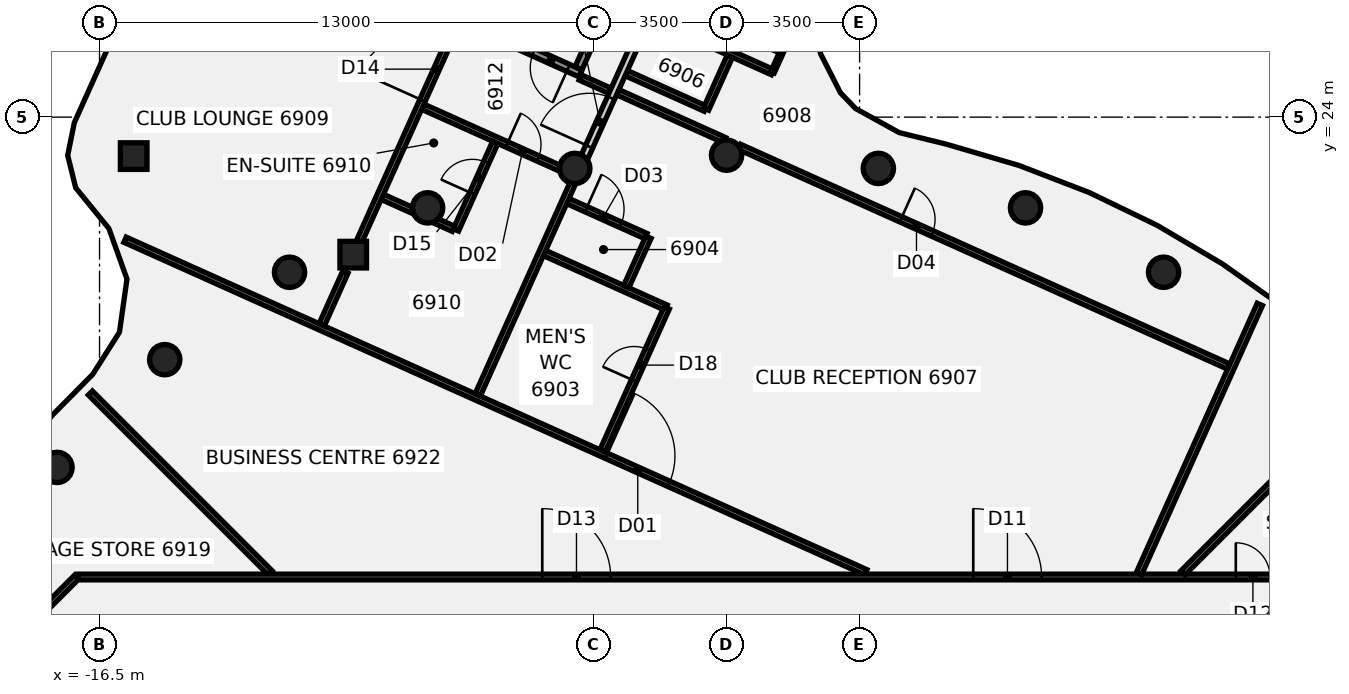
"""IFC4 building model, lengths in metres.
Left out: names, types, materials, properties, quantities, classifications, styles, units other than length and angle.
Written with IfcOpenShell. Run it as: python <this file> out.ifc"""

import sys

from ifc_helpers import new_model, si_unit, direction, frame, frame_2d, origin, origin_2d, place, context, subcontext, project, spatial, rectangle, circle, extrude, element, fill, save


model = new_model("IFC4")
c1 = context("Model", 3, precision=1e-05, world=origin(), true_north=direction((0.0, 1.0)))
c2 = subcontext(c1, "Body", "Model", "MODEL_VIEW")
j1 = project(units=[si_unit("LENGTHUNIT", "METRE"), si_unit("PLANEANGLEUNIT", "RADIAN")], contexts=[c1])
p1 = place(None, origin())
s1 = spatial("IfcSite", under=j1, at=p1, CompositionType="ELEMENT")
p2 = place(p1, origin())
s2 = spatial("IfcBuilding", under=s1, at=p2, CompositionType="ELEMENT")
p3 = place(p2, frame((0.0, 0.0, 271.2)))
s3 = spatial("IfcBuildingStorey", under=s2, at=p3, CompositionType="ELEMENT", Elevation=271.2)
for number, where, z_axis, x_axis in (
    (1, (11.5, 19.919, -0.14), (0.0, 0.0, 1.0), (1.0, 0.0, 0.0)),
    (2, (7.866, 21.613, -0.14), (0.0, 0.0, 1.0), (1.0, 0.0, 0.0)),
    (3, (3.994, 22.651, -0.14), (0.0, 0.0, 1.0), (1.0, 0.0, 0.0)),
    (4, (0.0, 23.0, -0.14), (0.0, 0.0, 1.0), (1.0, 0.0, 0.0)),
    (5, (-3.994, 22.651, -0.14), (0.0, 0.0, 1.0), (1.0, 0.0, 0.0)),
    (6, (-7.866, 21.613, -0.14), (0.0, 0.0, 1.0), (1.0, 0.0, 0.0)),
    (7, (-11.5, 19.919, -0.14), (0.0, 0.0, 1.0), (1.0, 0.0, 0.0)),
    (8, (-14.784, 17.619, -0.14), (0.0, 0.0, 1.0), (1.0, 0.0, 0.0)),
    (9, (-17.619, 14.784, -0.14), (0.0, 0.0, 1.0), (1.0, 0.0, 0.0)),
):
    element("IfcColumn", number, at=place(p3, frame(where, z_axis=z_axis, x_axis=x_axis)), inside=s3, PredefinedType="COLUMN", context=c2, shape_type="SweptSolid", body=[
        extrude(circle(Radius=0.4, at=origin_2d()), origin(), (0.0, 0.0, 1.0), 3.6),
    ])
p4 = place(p3, frame((-9.824, 20.382, -0.139), z_axis=(0.008608000025, -0.049614614315, 0.998731341444), x_axis=(0.410264887892, 0.91101157612, 0.041720857344)))
e10 = element("IfcColumn", 10, at=p4, inside=s3, PredefinedType="COLUMN", context=c2, shape_type="SweptSolid", body=[
    extrude(rectangle(XDim=0.7, YDim=0.7, at=origin_2d()), origin(), (0.0, 0.0, 1.0), 3.602),
])
p5 = place(p3, frame((-15.601, 22.975, -0.138), z_axis=(0.096287081646, -0.121046616926, 0.987965846798), x_axis=(0.413174316945, 0.907882535997, 0.070966785529)))
e11 = element("IfcColumn", 11, at=p5, inside=s3, PredefinedType="COLUMN", context=c2, shape_type="SweptSolid", body=[
    extrude(rectangle(XDim=0.7, YDim=0.7, at=origin_2d()), origin(), (0.0, 0.0, 1.0), 3.638),
])
p6 = place(p3, frame((-16.742, 16.742, 0.0), z_axis=(0.0, 0.0, 1.0), x_axis=(0.707106781187, -0.707106781187, 0.0)))
e12 = element("IfcWall", 12, at=p6, inside=s3, PredefinedType="PARTITIONING", context=c2, shape_type="SweptSolid", body=[
    extrude(rectangle(XDim=6.692, YDim=0.15, at=frame_2d((3.346, 0.0))), origin(), (0.0, 0.0, 1.0), 2.864),
])
p7 = place(p3, frame((-15.829, 20.775, 0.0), z_axis=(0.0, 0.0, 1.0), x_axis=(0.912288876362, -0.409547318469, 0.0)))
e13 = element("IfcWall", 13, at=p7, inside=s3, PredefinedType="PARTITIONING", context=c2, shape_type="SweptSolid", body=[
    extrude(rectangle(XDim=21.366, YDim=0.15, at=frame_2d((10.683, 0.0))), origin(), (0.0, 0.0, 1.0), 2.864),
])
p8 = place(p7, frame((13.889, 0.0, 0.0)))
e14 = element("IfcOpeningElement", 14, at=p8, cuts=e13, PredefinedType="OPENING", context=c2, shape_type="SweptSolid", body=[
    extrude(rectangle(XDim=1.8, YDim=2.1, at=frame_2d((0.9, 1.05))), frame((0.0, 0.085, 0.0), z_axis=(0.0, -1.0, 0.0), x_axis=(1.0, 0.0, 0.0)), (0.0, 0.0, 1.0), 0.17),
])
p9 = place(p3, frame((-9.06, 21.902, 0.0), z_axis=(0.0, 0.0, 1.0), x_axis=(0.912258944897, -0.409613985913, 0.0)))
e15 = element("IfcWall", 15, at=p9, inside=s3, PredefinedType="PARTITIONING", context=c2, shape_type="SweptSolid", body=[
    extrude(rectangle(XDim=0.879, YDim=0.15, at=frame_2d((0.439, 0.0))), origin(), (0.0, 0.0, 1.0), 2.864),
])
p10 = place(p3, frame((-7.65, 21.269, 0.0), z_axis=(0.0, 0.0, 1.0), x_axis=(0.912409667444, -0.409278143509, 0.0)))
e16 = element("IfcWall", 16, at=p10, inside=s3, PredefinedType="PARTITIONING", context=c2, shape_type="SweptSolid", body=[
    extrude(rectangle(XDim=0.505, YDim=0.15, at=frame_2d((0.252, 0.0))), origin(), (0.0, 0.0, 1.0), 2.864),
])
p11 = place(p3, frame((-7.99, 24.272, 0.0), z_axis=(0.0, 0.0, 1.0), x_axis=(0.912292721539, -0.409538753023, 0.0)))
e17 = element("IfcWall", 17, at=p11, inside=s3, PredefinedType="PARTITIONING", context=c2, shape_type="SweptSolid", body=[
    extrude(rectangle(XDim=3.934, YDim=0.15, at=frame_2d((1.967, 0.0))), origin(), (0.0, 0.0, 1.0), 2.864),
])
p12 = place(p11, frame((2.42, 0.0, 0.0)))
e18 = element("IfcOpeningElement", 18, at=p12, cuts=e17, PredefinedType="OPENING", context=c2, shape_type="SweptSolid", body=[
    extrude(rectangle(XDim=0.9, YDim=2.1, at=frame_2d((0.45, 1.05))), frame((0.0, 0.085, 0.0), z_axis=(0.0, -1.0, 0.0), x_axis=(1.0, 0.0, 0.0)), (0.0, 0.0, 1.0), 0.17),
])
p13 = place(p3, frame((-4.791, 20.424, 0.0), z_axis=(0.0, 0.0, 1.0), x_axis=(0.912213220813, -0.409715803667, 0.0)))
e19 = element("IfcWall", 19, at=p13, inside=s3, PredefinedType="PARTITIONING", context=c2, shape_type="SweptSolid", body=[
    extrude(rectangle(XDim=3.505, YDim=0.15, at=frame_2d((1.752, 0.0))), origin(), (0.0, 0.0, 1.0), 2.864),
])
p14 = place(p3, frame((-4.177, 21.792, 0.0), z_axis=(0.0, 0.0, 1.0), x_axis=(0.91230675478, -0.409507490998, 0.0)))
e20 = element("IfcWall", 20, at=p14, inside=s3, PredefinedType="PARTITIONING", context=c2, shape_type="SweptSolid", body=[
    extrude(rectangle(XDim=2.25, YDim=0.15, at=frame_2d((1.125, 0.0))), origin(), (0.0, 0.0, 1.0), 2.864),
])
p15 = place(p14, frame((0.525, 0.0, 0.0)))
e21 = element("IfcOpeningElement", 21, at=p15, cuts=e20, PredefinedType="OPENING", context=c2, shape_type="SweptSolid", body=[
    extrude(rectangle(XDim=1.0, YDim=2.1, at=frame_2d((0.5, 1.05))), frame((0.0, 0.085, 0.0), z_axis=(0.0, -1.0, 0.0), x_axis=(1.0, 0.0, 0.0)), (0.0, 0.0, 1.0), 0.17),
])
p16 = place(p3, frame((-3.85, 25.044, 0.0), z_axis=(0.0, 0.0, 1.0), x_axis=(0.91233270994, -0.409449662807, 0.0)))
e22 = element("IfcWall", 22, at=p16, inside=s3, PredefinedType="PARTITIONING", context=c2, shape_type="SweptSolid", body=[
    extrude(rectangle(XDim=0.854, YDim=0.15, at=frame_2d((0.427, 0.0))), origin(), (0.0, 0.0, 1.0), 2.864),
])
p17 = place(p3, frame((-2.864, 24.656, 0.0), z_axis=(0.0, 0.0, 1.0), x_axis=(0.912258042775, -0.409615995039, 0.0)))
e23 = element("IfcWall", 23, at=p17, inside=s3, PredefinedType="PARTITIONING", context=c2, shape_type="SweptSolid", body=[
    extrude(rectangle(XDim=3.078, YDim=0.15, at=frame_2d((1.539, 0.0))), origin(), (0.0, 0.0, 1.0), 2.864),
])
p18 = place(p3, frame((0.344, 23.216, 0.0), z_axis=(0.0, 0.0, 1.0), x_axis=(0.912270853128, -0.409587463838, 0.0)))
e24 = element("IfcWall", 24, at=p18, inside=s3, PredefinedType="PARTITIONING", context=c2, shape_type="SweptSolid", body=[
    extrude(rectangle(XDim=14.109, YDim=0.15, at=frame_2d((7.054, 0.0))), origin(), (0.0, 0.0, 1.0), 2.864),
])
p19 = place(p18, frame((4.65, 0.0, 0.0)))
e25 = element("IfcOpeningElement", 25, at=p19, cuts=e24, PredefinedType="OPENING", context=c2, shape_type="SweptSolid", body=[
    extrude(rectangle(XDim=0.9, YDim=2.1, at=frame_2d((0.45, 1.05))), frame((0.0, 0.085, 0.0), z_axis=(0.0, -1.0, 0.0), x_axis=(1.0, 0.0, 0.0)), (0.0, 0.0, 1.0), 0.17),
])
p20 = place(p3, frame((-2.638, 25.157, 0.0), z_axis=(0.0, 0.0, 1.0), x_axis=(0.912245848383, -0.409643152156, 0.0)))
e26 = element("IfcWall", 26, at=p20, inside=s3, PredefinedType="PARTITIONING", context=c2, shape_type="SweptSolid", body=[
    extrude(rectangle(XDim=2.28, YDim=0.15, at=frame_2d((1.14, 0.0))), origin(), (0.0, 0.0, 1.0), 2.864),
])
p21 = place(p3, frame((-1.983, 26.617, 0.0), z_axis=(0.0, 0.0, 1.0), x_axis=(0.912251445875, -0.409630686715, 0.0)))
e27 = element("IfcWall", 27, at=p21, inside=s3, PredefinedType="PARTITIONING", context=c2, shape_type="SweptSolid", body=[
    extrude(rectangle(XDim=3.5, YDim=0.15, at=frame_2d((1.75, 0.0))), origin(), (0.0, 0.0, 1.0), 2.864),
])
p22 = place(p21, frame((0.5, 0.0, 0.0)))
e28 = element("IfcOpeningElement", 28, at=p22, cuts=e27, PredefinedType="OPENING", context=c2, shape_type="SweptSolid", body=[
    extrude(rectangle(XDim=0.9, YDim=2.1, at=frame_2d((0.45, 1.05))), frame((0.0, 0.085, 0.0), z_axis=(0.0, -1.0, 0.0), x_axis=(1.0, 0.0, 0.0)), (0.0, 0.0, 1.0), 0.17),
])
p23 = place(p3, frame((-17.065, 11.9, 0.0), z_axis=(0.0, 0.0, 1.0), x_axis=(1.0, 0.0, 0.0)))
e29 = element("IfcWall", 29, at=p23, inside=s3, PredefinedType="PARTITIONING", context=c2, shape_type="SweptSolid", body=[
    extrude(rectangle(XDim=34.165, YDim=0.15, at=frame_2d((17.083, 0.0))), origin(), (0.0, 0.0, 1.0), 2.864),
])
p24 = place(p23, frame((23.556, 0.0, 0.0)))
e30 = element("IfcOpeningElement", 30, at=p24, cuts=e29, PredefinedType="OPENING", context=c2, shape_type="SweptSolid", body=[
    extrude(rectangle(XDim=1.8, YDim=2.1, at=frame_2d((0.9, 1.05))), frame((0.0, 0.085, 0.0), z_axis=(0.0, -1.0, 0.0), x_axis=(1.0, 0.0, 0.0)), (0.0, 0.0, 1.0), 0.17),
])
p25 = place(p23, frame((30.465, 0.0, 0.0)))
e31 = element("IfcOpeningElement", 31, at=p25, cuts=e29, PredefinedType="OPENING", context=c2, shape_type="SweptSolid", body=[
    extrude(rectangle(XDim=0.9, YDim=2.1, at=frame_2d((0.45, 1.05))), frame((0.0, 0.085, 0.0), z_axis=(0.0, -1.0, 0.0), x_axis=(1.0, 0.0, 0.0)), (0.0, 0.0, 1.0), 0.17),
])
p26 = place(p23, frame((12.215, 0.0, 0.0)))
e32 = element("IfcOpeningElement", 32, at=p26, cuts=e29, PredefinedType="OPENING", context=c2, shape_type="SweptSolid", body=[
    extrude(rectangle(XDim=1.8, YDim=2.1, at=frame_2d((0.9, 1.05))), frame((0.0, 0.085, 0.0), z_axis=(0.0, -1.0, 0.0), x_axis=(1.0, 0.0, 0.0)), (0.0, 0.0, 1.0), 0.17),
])
p27 = place(p3, frame((-18.872, 10.128, 0.0), z_axis=(0.0, 0.0, 1.0), x_axis=(0.707106781187, 0.707106781187, 0.0)))
e33 = element("IfcWall", 33, at=p27, inside=s3, PredefinedType="PARTITIONING", context=c2, shape_type="SweptSolid", body=[
    extrude(rectangle(XDim=2.505, YDim=0.15, at=frame_2d((1.253, 0.0))), origin(), (0.0, 0.0, 1.0), 2.864),
])
p28 = place(p3, frame((12.01, 12.01, 0.0), z_axis=(0.0, 0.0, 1.0), x_axis=(0.707106781187, 0.707106781187, 0.0)))
e34 = element("IfcWall", 34, at=p28, inside=s3, PredefinedType="PARTITIONING", context=c2, shape_type="SweptSolid", body=[
    extrude(rectangle(XDim=6.691, YDim=0.15, at=frame_2d((3.345, 0.0))), origin(), (0.0, 0.0, 1.0), 2.864),
])
p29 = place(p3, frame((-10.654, 18.534, 0.0), z_axis=(0.0, 0.0, 1.0), x_axis=(0.409685570303, 0.912226799368, 0.0)))
e35 = element("IfcWall", 35, at=p29, inside=s3, PredefinedType="PARTITIONING", context=c2, shape_type="SweptSolid", body=[
    extrude(rectangle(XDim=1.525, YDim=0.15, at=frame_2d((0.762, 0.0))), origin(), (0.0, 0.0, 1.0), 2.864),
])
p30 = place(p3, frame((-9.686, 20.69, 0.0), z_axis=(0.0, 0.0, 1.0), x_axis=(0.409693375843, 0.912223293822, 0.0)))
e36 = element("IfcWall", 36, at=p30, inside=s3, PredefinedType="PARTITIONING", context=c2, shape_type="SweptSolid", body=[
    extrude(rectangle(XDim=6.322, YDim=0.15, at=frame_2d((3.161, 0.0))), origin(), (0.0, 0.0, 1.0), 2.864),
])
p31 = place(p30, frame((4.113, 0.0, 0.0)))
e37 = element("IfcOpeningElement", 37, at=p31, cuts=e36, PredefinedType="OPENING", context=c2, shape_type="SweptSolid", body=[
    extrude(rectangle(XDim=1.8, YDim=2.1, at=frame_2d((0.9, 1.05))), frame((0.0, 0.085, 0.0), z_axis=(0.0, -1.0, 0.0), x_axis=(1.0, 0.0, 0.0)), (0.0, 0.0, 1.0), 0.17),
])
p32 = place(p3, frame((-7.121, 21.032, 0.0), z_axis=(0.0, 0.0, 1.0), x_axis=(0.409624884937, 0.912254051041, 0.0)))
e38 = element("IfcWall", 38, at=p32, inside=s3, PredefinedType="PARTITIONING", context=c2, shape_type="SweptSolid", body=[
    extrude(rectangle(XDim=2.525, YDim=0.15, at=frame_2d((1.263, 0.0))), origin(), (0.0, 0.0, 1.0), 2.864),
])
p33 = place(p32, frame((1.05, 0.0, 0.0)))
e39 = element("IfcOpeningElement", 39, at=p33, cuts=e38, PredefinedType="OPENING", context=c2, shape_type="SweptSolid", body=[
    extrude(rectangle(XDim=0.9, YDim=2.1, at=frame_2d((0.45, 1.05))), frame((0.0, 0.085, 0.0), z_axis=(0.0, -1.0, 0.0), x_axis=(1.0, 0.0, 0.0)), (0.0, 0.0, 1.0), 0.17),
])
p34 = place(p3, frame((-6.548, 16.691, 0.0), z_axis=(0.0, 0.0, 1.0), x_axis=(0.409506235987, 0.912307318116, 0.0)))
e40 = element("IfcWall", 40, at=p34, inside=s3, PredefinedType="PARTITIONING", context=c2, shape_type="SweptSolid", body=[
    extrude(rectangle(XDim=6.257, YDim=0.15, at=frame_2d((3.128, 0.0))), origin(), (0.0, 0.0, 1.0), 2.864),
])
p35 = place(p3, frame((-3.802, 22.81, 0.0), z_axis=(0.0, 0.0, 1.0), x_axis=(0.409510455396, 0.912305424143, 0.0)))
e41 = element("IfcWall", 41, at=p35, inside=s3, PredefinedType="PARTITIONING", context=c2, shape_type="SweptSolid", body=[
    extrude(rectangle(XDim=7.417, YDim=0.2, at=frame_2d((3.708, 0.0))), origin(), (0.0, 0.0, 1.0), 2.864),
])
p36 = place(p35, frame((0.458, 0.0, 0.0)))
e42 = element("IfcOpeningElement", 42, at=p36, cuts=e41, PredefinedType="OPENING", context=c2, shape_type="SweptSolid", body=[
    extrude(rectangle(XDim=1.4, YDim=2.1, at=frame_2d((0.7, 1.05))), frame((0.0, 0.11, 0.0), z_axis=(0.0, -1.0, 0.0), x_axis=(1.0, 0.0, 0.0)), (0.0, 0.0, 1.0), 0.22),
])
p37 = place(p35, frame((4.968, 0.0, 0.0)))
e43 = element("IfcOpeningElement", 43, at=p37, cuts=e41, PredefinedType="OPENING", context=c2, shape_type="SweptSolid", body=[
    extrude(rectangle(XDim=0.9, YDim=2.1, at=frame_2d((0.45, 1.05))), frame((0.0, 0.11, 0.0), z_axis=(0.0, -1.0, 0.0), x_axis=(1.0, 0.0, 0.0)), (0.0, 0.0, 1.0), 0.22),
])
p38 = place(p3, frame((-3.264, 15.217, 0.0), z_axis=(0.0, 0.0, 1.0), x_axis=(0.409606488137, 0.912262311441, 0.0)))
e44 = element("IfcWall", 44, at=p38, inside=s3, PredefinedType="PARTITIONING", context=c2, shape_type="SweptSolid", body=[
    extrude(rectangle(XDim=4.125, YDim=0.15, at=frame_2d((2.062, 0.0))), origin(), (0.0, 0.0, 1.0), 2.864),
])
p39 = place(p38, frame((2.025, 0.0, 0.0)))
e45 = element("IfcOpeningElement", 45, at=p39, cuts=e44, PredefinedType="OPENING", context=c2, shape_type="SweptSolid", body=[
    extrude(rectangle(XDim=0.9, YDim=2.1, at=frame_2d((0.45, 1.05))), frame((0.0, 0.085, 0.0), z_axis=(0.0, -1.0, 0.0), x_axis=(1.0, 0.0, 0.0)), (0.0, 0.0, 1.0), 0.17),
])
p40 = place(p3, frame((1.21, 25.184, 0.0), z_axis=(0.0, 0.0, 1.0), x_axis=(0.409598326261, 0.912265976086, 0.0)))
e46 = element("IfcWall", 46, at=p40, inside=s3, PredefinedType="PARTITIONING", context=c2, shape_type="SweptSolid", body=[
    extrude(rectangle(XDim=2.093, YDim=0.1, at=frame_2d((1.047, 0.0))), origin(), (0.0, 0.0, 1.0), 2.864),
])
p41 = place(p40, frame((0.5, 0.0, 0.0)))
e47 = element("IfcOpeningElement", 47, at=p41, cuts=e46, PredefinedType="OPENING", context=c2, shape_type="SweptSolid", body=[
    extrude(rectangle(XDim=0.9, YDim=2.1, at=frame_2d((0.45, 1.05))), frame((0.0, 0.06, 0.0), z_axis=(0.0, -1.0, 0.0), x_axis=(1.0, 0.0, 0.0)), (0.0, 0.0, 1.0), 0.12),
])
p42 = place(p3, frame((-2.639, 19.54, 0.0), z_axis=(0.0, 0.0, 1.0), x_axis=(0.409965725426, 0.912100928612, 0.0)))
e48 = element("IfcWall", 48, at=p42, inside=s3, PredefinedType="PARTITIONING", context=c2, shape_type="SweptSolid", body=[
    extrude(rectangle(XDim=1.425, YDim=0.15, at=frame_2d((0.712, 0.0))), origin(), (0.0, 0.0, 1.0), 2.864),
])
p43 = place(p3, frame((-0.538, 24.214, 0.0), z_axis=(0.0, 0.0, 1.0), x_axis=(0.410085127613, 0.91204725103, 0.0)))
e49 = element("IfcWall", 49, at=p43, inside=s3, PredefinedType="PARTITIONING", context=c2, shape_type="SweptSolid", body=[
    extrude(rectangle(XDim=1.525, YDim=0.15, at=frame_2d((0.763, 0.0))), origin(), (0.0, 0.0, 1.0), 2.864),
])
p44 = place(p3, frame((10.851, 11.987, 0.0), z_axis=(0.0, 0.0, 1.0), x_axis=(0.409585598201, 0.912271690751, 0.0)))
e50 = element("IfcWall", 50, at=p44, inside=s3, PredefinedType="PARTITIONING", context=c2, shape_type="SweptSolid", body=[
    extrude(rectangle(XDim=7.767, YDim=0.15, at=frame_2d((3.884, 0.0))), origin(), (0.0, 0.0, 1.0), 2.864),
])
p45 = place(p3, frame((-3.846, 25.152, -0.14), z_axis=(0.0, 0.0, 1.0), x_axis=(-0.912278425162, 0.409570598291, 0.0)))
e51 = element("IfcWall", 51, at=p45, inside=s3, PredefinedType="SHEAR", context=c2, shape_type="SweptSolid", body=[
    extrude(rectangle(XDim=6.7, YDim=0.2, at=frame_2d((3.35, 0.0))), origin(), (0.0, 0.0, 1.0), 3.154),
])
p46 = place(p45, frame((0.35, 0.0, 0.0)))
e52 = element("IfcOpeningElement", 52, at=p46, cuts=e51, PredefinedType="OPENING", context=c2, shape_type="SweptSolid", body=[
    extrude(rectangle(XDim=1.0, YDim=2.1, at=frame_2d((0.5, 1.05))), frame((0.0, 0.11, 0.0), z_axis=(0.0, -1.0, 0.0), x_axis=(1.0, 0.0, 0.0)), (0.0, 0.0, 1.0), 0.22),
])
p47 = place(p3, frame((-2.586, 28.203, -0.14), z_axis=(0.0, 0.0, 1.0), x_axis=(-0.409561893765, -0.912282333039, 0.0)))
e53 = element("IfcWall", 53, at=p47, inside=s3, PredefinedType="SHEAR", context=c2, shape_type="SweptSolid", body=[
    extrude(rectangle(XDim=3.2, YDim=0.2, at=frame_2d((1.6, 0.0))), origin(), (0.0, 0.0, 1.0), 3.6),
])
p48 = place(p8, origin())
e54 = element("IfcDoor", 54, at=p48, inside=s3, OperationType="DOUBLE_DOOR_SINGLE_SWING", PredefinedType="DOOR", context=c2, shape_type="SweptSolid", body=[
    extrude(rectangle(XDim=1.8, YDim=2.1, at=frame_2d((0.9, 1.05))), frame((0.0, 0.025, 0.0), z_axis=(0.0, -1.0, 0.0), x_axis=(1.0, 0.0, 0.0)), (0.0, 0.0, 1.0), 0.05),
])
fill(e14, e54)
p49 = place(p12, frame((0.9, 0.0, 0.0), z_axis=(0.0, 0.0, 1.0), x_axis=(-1.0, 0.0, 0.0)))
e55 = element("IfcDoor", 55, at=p49, inside=s3, OperationType="SINGLE_SWING_RIGHT", PredefinedType="DOOR", context=c2, shape_type="SweptSolid", body=[
    extrude(rectangle(XDim=0.9, YDim=2.1, at=frame_2d((0.45, 1.05))), frame((0.0, 0.025, 0.0), z_axis=(0.0, -1.0, 0.0), x_axis=(1.0, 0.0, 0.0)), (0.0, 0.0, 1.0), 0.05),
])
fill(e18, e55)
p50 = place(p15, frame((1.0, 0.0, 0.0), z_axis=(0.0, 0.0, 1.0), x_axis=(-1.0, 0.0, 0.0)))
e56 = element("IfcDoor", 56, at=p50, inside=s3, OperationType="SINGLE_SWING_LEFT", PredefinedType="DOOR", context=c2, shape_type="SweptSolid", body=[
    extrude(rectangle(XDim=1.0, YDim=2.1, at=frame_2d((0.5, 1.05))), frame((0.0, 0.025, 0.0), z_axis=(0.0, -1.0, 0.0), x_axis=(1.0, 0.0, 0.0)), (0.0, 0.0, 1.0), 0.05),
])
fill(e21, e56)
p51 = place(p19, origin())
e57 = element("IfcDoor", 57, at=p51, inside=s3, OperationType="SINGLE_SWING_RIGHT", PredefinedType="DOOR", context=c2, shape_type="SweptSolid", body=[
    extrude(rectangle(XDim=0.9, YDim=2.1, at=frame_2d((0.45, 1.05))), frame((0.0, 0.025, 0.0), z_axis=(0.0, -1.0, 0.0), x_axis=(1.0, 0.0, 0.0)), (0.0, 0.0, 1.0), 0.05),
])
fill(e25, e57)
p52 = place(p24, frame((1.8, 0.0, 0.0), z_axis=(0.0, 0.0, 1.0), x_axis=(-1.0, 0.0, 0.0)))
e58 = element("IfcDoor", 58, at=p52, inside=s3, OperationType="DOUBLE_DOOR_SINGLE_SWING", PredefinedType="DOOR", context=c2, shape_type="SweptSolid", body=[
    extrude(rectangle(XDim=1.8, YDim=2.1, at=frame_2d((0.9, 1.05))), frame((0.0, 0.025, 0.0), z_axis=(0.0, -1.0, 0.0), x_axis=(1.0, 0.0, 0.0)), (0.0, 0.0, 1.0), 0.05),
])
fill(e30, e58)
p53 = place(p25, origin())
e59 = element("IfcDoor", 59, at=p53, inside=s3, OperationType="SINGLE_SWING_LEFT", PredefinedType="DOOR", context=c2, shape_type="SweptSolid", body=[
    extrude(rectangle(XDim=0.9, YDim=2.1, at=frame_2d((0.45, 1.05))), frame((0.0, 0.025, 0.0), z_axis=(0.0, -1.0, 0.0), x_axis=(1.0, 0.0, 0.0)), (0.0, 0.0, 1.0), 0.05),
])
fill(e31, e59)
p54 = place(p26, frame((1.8, 0.0, 0.0), z_axis=(0.0, 0.0, 1.0), x_axis=(-1.0, 0.0, 0.0)))
e60 = element("IfcDoor", 60, at=p54, inside=s3, OperationType="DOUBLE_DOOR_SINGLE_SWING", PredefinedType="DOOR", context=c2, shape_type="SweptSolid", body=[
    extrude(rectangle(XDim=1.8, YDim=2.1, at=frame_2d((0.9, 1.05))), frame((0.0, 0.025, 0.0), z_axis=(0.0, -1.0, 0.0), x_axis=(1.0, 0.0, 0.0)), (0.0, 0.0, 1.0), 0.05),
])
fill(e32, e60)
p55 = place(p31, origin())
e61 = element("IfcDoor", 61, at=p55, inside=s3, OperationType="DOUBLE_DOOR_SINGLE_SWING", PredefinedType="DOOR", context=c2, shape_type="SweptSolid", body=[
    extrude(rectangle(XDim=1.8, YDim=2.1, at=frame_2d((0.9, 1.05))), frame((0.0, 0.025, 0.0), z_axis=(0.0, -1.0, 0.0), x_axis=(1.0, 0.0, 0.0)), (0.0, 0.0, 1.0), 0.05),
])
fill(e37, e61)
p56 = place(p33, origin())
e62 = element("IfcDoor", 62, at=p56, inside=s3, OperationType="SINGLE_SWING_LEFT", PredefinedType="DOOR", context=c2, shape_type="SweptSolid", body=[
    extrude(rectangle(XDim=0.9, YDim=2.1, at=frame_2d((0.45, 1.05))), frame((0.0, 0.025, 0.0), z_axis=(0.0, -1.0, 0.0), x_axis=(1.0, 0.0, 0.0)), (0.0, 0.0, 1.0), 0.05),
])
fill(e39, e62)
p57 = place(p36, frame((1.4, 0.0, 0.0), z_axis=(0.0, 0.0, 1.0), x_axis=(-1.0, 0.0, 0.0)))
e63 = element("IfcDoor", 63, at=p57, inside=s3, OperationType="DOUBLE_DOOR_SINGLE_SWING", PredefinedType="DOOR", context=c2, shape_type="SweptSolid", body=[
    extrude(rectangle(XDim=1.4, YDim=2.1, at=frame_2d((0.7, 1.05))), frame((0.0, 0.025, 0.0), z_axis=(0.0, -1.0, 0.0), x_axis=(1.0, 0.0, 0.0)), (0.0, 0.0, 1.0), 0.05),
])
fill(e42, e63)
p58 = place(p39, origin())
e64 = element("IfcDoor", 64, at=p58, inside=s3, OperationType="SINGLE_SWING_LEFT", PredefinedType="DOOR", context=c2, shape_type="SweptSolid", body=[
    extrude(rectangle(XDim=0.9, YDim=2.1, at=frame_2d((0.45, 1.05))), frame((0.0, 0.025, 0.0), z_axis=(0.0, -1.0, 0.0), x_axis=(1.0, 0.0, 0.0)), (0.0, 0.0, 1.0), 0.05),
])
fill(e45, e64)
p59 = place(p41, origin())
e65 = element("IfcDoor", 65, at=p59, inside=s3, OperationType="SINGLE_SWING_RIGHT", PredefinedType="DOOR", context=c2, shape_type="SweptSolid", body=[
    extrude(rectangle(XDim=0.9, YDim=2.1, at=frame_2d((0.45, 1.05))), frame((0.0, 0.025, 0.0), z_axis=(0.0, -1.0, 0.0), x_axis=(1.0, 0.0, 0.0)), (0.0, 0.0, 1.0), 0.05),
])
fill(e47, e65)
p60 = place(p46, origin())
e66 = element("IfcDoor", 66, at=p60, inside=s3, OperationType="SINGLE_SWING_LEFT", PredefinedType="DOOR", context=c2, shape_type="SweptSolid", body=[
    extrude(rectangle(XDim=1.0, YDim=2.1, at=frame_2d((0.5, 1.05))), frame((0.0, 0.025, 0.0), z_axis=(0.0, -1.0, 0.0), x_axis=(1.0, 0.0, 0.0)), (0.0, 0.0, 1.0), 0.05),
])
fill(e52, e66)
save(model, sys.argv[1])
